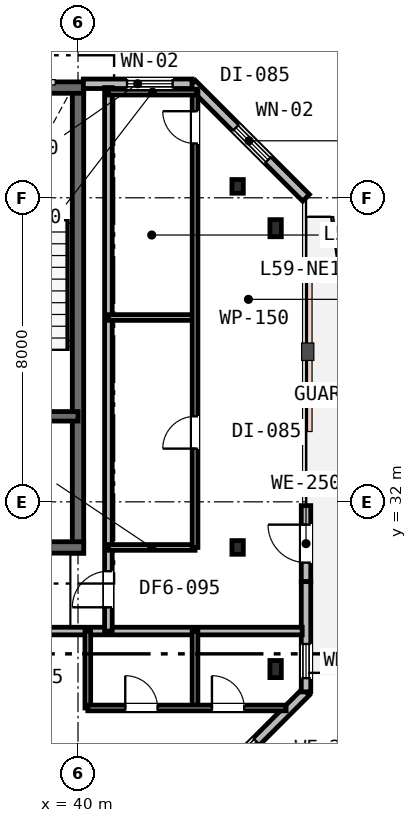
"""IFC4 building model, lengths in metres.
Left out: names, types, materials, properties, quantities, classifications, styles, units other than length and angle.
Written with IfcOpenShell. Run it as: python <this file> out.ifc"""

import sys

from ifc_helpers import new_model, si_unit, direction, frame, frame_2d, origin, origin_2d, place, context, subcontext, project, spatial, rectangle, i_section, extrude, element, fill, save


model = new_model("IFC4")
c1 = context("Model", 3, precision=1e-05, world=origin(), true_north=direction((0.0, 1.0)))
c2 = subcontext(c1, "Body", "Model", "MODEL_VIEW")
j1 = project(units=[si_unit("LENGTHUNIT", "METRE"), si_unit("PLANEANGLEUNIT", "RADIAN")], contexts=[c1])
p1 = place(None, origin())
s1 = spatial("IfcSite", under=j1, at=p1, CompositionType="ELEMENT")
p2 = place(p1, origin())
s2 = spatial("IfcBuilding", under=s1, at=p2, CompositionType="ELEMENT")
p3 = place(p2, frame((0.0, 0.0, 229.8)))
s3 = spatial("IfcBuildingStorey", under=s2, at=p3, CompositionType="ELEMENT", Elevation=229.8)
p4 = place(p3, frame((40.0, 30.65, 0.0), z_axis=(0.0, 0.0, 1.0), x_axis=(0.0, 1.0, 0.0)))
e1 = element("IfcWall", 1, at=p4, inside=s3, PredefinedType="SHEAR", context=c2, shape_type="SweptSolid", body=[
    extrude(rectangle(XDim=12.3, YDim=0.3, at=frame_2d((6.15, 0.0))), origin(), (0.0, 0.0, 1.0), 3.8),
])
p5 = place(p3, frame((15.85, 42.9, 0.0), z_axis=(0.0, 0.0, 1.0), x_axis=(1.0, 0.0, 0.0)))
e2 = element("IfcWall", 2, at=p5, inside=s3, PredefinedType="SHEAR", context=c2, shape_type="SweptSolid", body=[
    extrude(rectangle(XDim=24.3, YDim=0.3, at=frame_2d((12.15, 0.0))), origin(), (0.0, 0.0, 1.0), 3.8),
])
p6 = place(p5, frame((1.6, 0.0, 0.95)))
e3 = element("IfcOpeningElement", 3, at=p6, cuts=e2, PredefinedType="OPENING", context=c2, shape_type="SweptSolid", body=[
    extrude(rectangle(XDim=1.2, YDim=1.6, at=frame_2d((0.6, 0.8))), frame((0.0, 0.16, 0.0), z_axis=(0.0, -1.0, 0.0), x_axis=(1.0, 0.0, 0.0)), (0.0, 0.0, 1.0), 0.32),
])
p7 = place(p5, frame((16.5, 0.0, 0.95)))
e4 = element("IfcOpeningElement", 4, at=p7, cuts=e2, PredefinedType="OPENING", context=c2, shape_type="SweptSolid", body=[
    extrude(rectangle(XDim=1.2, YDim=1.6, at=frame_2d((0.6, 0.8))), frame((0.0, 0.16, 0.0), z_axis=(0.0, -1.0, 0.0), x_axis=(1.0, 0.0, 0.0)), (0.0, 0.0, 1.0), 0.32),
])
p8 = place(p5, frame((21.6, 0.0, 0.95)))
e5 = element("IfcOpeningElement", 5, at=p8, cuts=e2, PredefinedType="OPENING", context=c2, shape_type="SweptSolid", body=[
    extrude(rectangle(XDim=1.2, YDim=1.6, at=frame_2d((0.6, 0.8))), frame((0.0, 0.16, 0.0), z_axis=(0.0, -1.0, 0.0), x_axis=(1.0, 0.0, 0.0)), (0.0, 0.0, 1.0), 0.32),
])
p9 = place(p3, frame((28.95, 30.8, 0.0), z_axis=(0.0, 0.0, 1.0), x_axis=(1.0, 0.0, 0.0)))
e6 = element("IfcWall", 6, at=p9, inside=s3, PredefinedType="SHEAR", context=c2, shape_type="SweptSolid", body=[
    extrude(rectangle(XDim=11.2, YDim=0.3, at=frame_2d((5.6, 0.0))), origin(), (0.0, 0.0, 1.0), 3.8),
])
p10 = place(p9, frame((7.65, 0.0, 0.0)))
e7 = element("IfcOpeningElement", 7, at=p10, cuts=e6, PredefinedType="OPENING", context=c2, shape_type="SweptSolid", body=[
    extrude(rectangle(XDim=1.1, YDim=2.15, at=frame_2d((0.55, 1.075))), frame((0.0, 0.16, 0.0), z_axis=(0.0, -1.0, 0.0), x_axis=(1.0, 0.0, 0.0)), (0.0, 0.0, 1.0), 0.32),
])
p11 = place(p3, frame((33.95, 34.25, 0.0), z_axis=(0.0, 0.0, 1.0), x_axis=(1.0, 0.0, 0.0)))
e8 = element("IfcWall", 8, at=p11, inside=s3, PredefinedType="SHEAR", context=c2, shape_type="SweptSolid", body=[
    extrude(rectangle(XDim=6.05, YDim=0.25, at=frame_2d((3.025, 0.0))), origin(), (0.0, 0.0, 1.0), 3.8),
])
p12 = place(p11, frame((3.7, 0.0, 0.0)))
e9 = element("IfcOpeningElement", 9, at=p12, cuts=e8, PredefinedType="OPENING", context=c2, shape_type="SweptSolid", body=[
    extrude(rectangle(XDim=1.0, YDim=2.15, at=frame_2d((0.5, 1.075))), frame((0.0, 0.135, 0.0), z_axis=(0.0, -1.0, 0.0), x_axis=(1.0, 0.0, 0.0)), (0.0, 0.0, 1.0), 0.27),
])
p13 = place(p11, frame((0.55, 0.0, 0.0)))
e10 = element("IfcOpeningElement", 10, at=p13, cuts=e8, PredefinedType="OPENING", context=c2, shape_type="SweptSolid", body=[
    extrude(rectangle(XDim=1.1, YDim=2.15, at=frame_2d((0.55, 1.075))), frame((0.0, 0.135, 0.0), z_axis=(0.0, -1.0, 0.0), x_axis=(1.0, 0.0, 0.0)), (0.0, 0.0, 1.0), 0.27),
])
for number, where, z_axis, x_axis in (
    (11, (45.2, 27.6, 0.0), (0.0, 0.0, 1.0), (1.0, 0.0, 0.0)),
    (12, (45.2, 39.2, 0.0), (0.0, 0.0, 1.0), (1.0, 0.0, 0.0)),
):
    element("IfcColumn", number, at=place(p3, frame(where, z_axis=z_axis, x_axis=x_axis)), inside=s3, PredefinedType="COLUMN", context=c2, shape_type="SweptSolid", body=[
        extrude(i_section(OverallWidth=0.3, OverallDepth=0.45, WebThickness=0.014, FlangeThickness=0.026, FilletRadius=0.027, at=origin_2d()), origin(), (0.0, 0.0, 1.0), 3.8),
    ])
for number, where, z_axis, x_axis in (
    (13, (44.2, 30.8, 0.0), (0.0, 0.0, 1.0), (1.0, 0.0, 0.0)),
    (14, (44.2, 40.3, 0.0), (0.0, 0.0, 1.0), (1.0, 0.0, 0.0)),
):
    element("IfcColumn", number, at=place(p3, frame(where, z_axis=z_axis, x_axis=x_axis)), inside=s3, PredefinedType="COLUMN", context=c2, shape_type="SweptSolid", body=[
        extrude(i_section(OverallWidth=0.3, OverallDepth=0.36, WebThickness=0.013, FlangeThickness=0.022, FilletRadius=0.027, at=origin_2d()), origin(), (0.0, 0.0, 1.0), 3.8),
    ])
p14 = place(p3, frame((43.0, 24.0, 0.0), z_axis=(0.0, 0.0, 1.0), x_axis=(0.707106781187, 0.707106781187, 0.0)))
e15 = element("IfcWall", 15, at=p14, inside=s3, PredefinedType="STANDARD", context=c2, shape_type="SweptSolid", body=[
    extrude(rectangle(XDim=4.243, YDim=0.25, at=frame_2d((2.121, 0.0))), origin(), (0.0, 0.0, 1.0), 3.53),
])
p15 = place(p14, frame((1.196, 0.0, 0.85)))
e16 = element("IfcOpeningElement", 16, at=p15, cuts=e15, PredefinedType="OPENING", context=c2, shape_type="SweptSolid", body=[
    extrude(rectangle(XDim=1.2, YDim=1.6, at=frame_2d((0.6, 0.8))), frame((0.0, 0.135, 0.0), z_axis=(0.0, -1.0, 0.0), x_axis=(1.0, 0.0, 0.0)), (0.0, 0.0, 1.0), 0.27),
])
p16 = place(p3, frame((46.0, 29.9, 0.0), z_axis=(0.0, 0.0, 1.0), x_axis=(0.0, 1.0, 0.0)))
e17 = element("IfcWall", 17, at=p16, inside=s3, PredefinedType="STANDARD", context=c2, shape_type="SweptSolid", body=[
    extrude(rectangle(XDim=2.0, YDim=0.25, at=frame_2d((1.0, 0.0))), origin(), (0.0, 0.0, 1.0), 3.53),
])
p17 = place(p16, frame((0.5, 0.0, 0.0)))
e18 = element("IfcOpeningElement", 18, at=p17, cuts=e17, PredefinedType="OPENING", context=c2, shape_type="SweptSolid", body=[
    extrude(rectangle(XDim=1.0, YDim=2.15, at=frame_2d((0.5, 1.075))), frame((0.0, 0.135, 0.0), z_axis=(0.0, -1.0, 0.0), x_axis=(1.0, 0.0, 0.0)), (0.0, 0.0, 1.0), 0.27),
])
p18 = place(p3, frame((46.0, 27.0, 0.0), z_axis=(0.0, 0.0, 1.0), x_axis=(0.0, 1.0, 0.0)))
e19 = element("IfcWall", 19, at=p18, inside=s3, PredefinedType="STANDARD", context=c2, shape_type="SweptSolid", body=[
    extrude(rectangle(XDim=2.9, YDim=0.25, at=frame_2d((1.45, 0.0))), origin(), (0.0, 0.0, 1.0), 3.53),
])
p19 = place(p18, frame((0.36, 0.0, 0.9)))
e20 = element("IfcOpeningElement", 20, at=p19, cuts=e19, PredefinedType="OPENING", context=c2, shape_type="SweptSolid", body=[
    extrude(rectangle(XDim=0.9, YDim=1.55, at=frame_2d((0.45, 0.775))), frame((0.0, 0.135, 0.0), z_axis=(0.0, -1.0, 0.0), x_axis=(1.0, 0.0, 0.0)), (0.0, 0.0, 1.0), 0.27),
])
p20 = place(p3, frame((46.0, 40.0, 0.0), z_axis=(0.0, 0.0, 1.0), x_axis=(-0.707106781187, 0.707106781187, 0.0)))
e21 = element("IfcWall", 21, at=p20, inside=s3, PredefinedType="STANDARD", context=c2, shape_type="SweptSolid", body=[
    extrude(rectangle(XDim=4.243, YDim=0.25, at=frame_2d((2.121, 0.0))), origin(), (0.0, 0.0, 1.0), 3.53),
])
p21 = place(p20, frame((1.411, 0.0, 0.85)))
e22 = element("IfcOpeningElement", 22, at=p21, cuts=e21, PredefinedType="OPENING", context=c2, shape_type="SweptSolid", body=[
    extrude(rectangle(XDim=1.2, YDim=1.6, at=frame_2d((0.6, 0.8))), frame((0.0, 0.135, 0.0), z_axis=(0.0, -1.0, 0.0), x_axis=(1.0, 0.0, 0.0)), (0.0, 0.0, 1.0), 0.27),
])
p22 = place(p3, frame((43.0, 43.0, 0.0), z_axis=(0.0, 0.0, 1.0), x_axis=(-1.0, 0.0, 0.0)))
e23 = element("IfcWall", 23, at=p22, inside=s3, PredefinedType="STANDARD", context=c2, shape_type="SweptSolid", body=[
    extrude(rectangle(XDim=2.86, YDim=0.25, at=frame_2d((1.43, 0.0))), origin(), (0.0, 0.0, 1.0), 3.53),
])
p23 = place(p22, frame((0.51, 0.0, 0.85)))
e24 = element("IfcOpeningElement", 24, at=p23, cuts=e23, PredefinedType="OPENING", context=c2, shape_type="SweptSolid", body=[
    extrude(rectangle(XDim=1.2, YDim=1.6, at=frame_2d((0.6, 0.8))), frame((0.0, 0.135, 0.0), z_axis=(0.0, -1.0, 0.0), x_axis=(1.0, 0.0, 0.0)), (0.0, 0.0, 1.0), 0.27),
])
p24 = place(p3, frame((20.2, 28.6, 0.0), z_axis=(0.0, 0.0, 1.0), x_axis=(1.0, 0.0, 0.0)))
e25 = element("IfcWall", 25, at=p24, inside=s3, PredefinedType="PARTITIONING", context=c2, shape_type="SweptSolid", body=[
    extrude(rectangle(XDim=25.7, YDim=0.2, at=frame_2d((12.85, 0.0))), origin(), (0.0, 0.0, 1.0), 2.92),
])
p25 = place(p24, frame((4.475, 0.0, 0.0)))
e26 = element("IfcOpeningElement", 26, at=p25, cuts=e25, PredefinedType="OPENING", context=c2, shape_type="SweptSolid", body=[
    extrude(rectangle(XDim=0.95, YDim=2.15, at=frame_2d((0.475, 1.075))), frame((0.0, 0.11, 0.0), z_axis=(0.0, -1.0, 0.0), x_axis=(1.0, 0.0, 0.0)), (0.0, 0.0, 1.0), 0.22),
])
p26 = place(p24, frame((10.875, 0.0, 0.0)))
e27 = element("IfcOpeningElement", 27, at=p26, cuts=e25, PredefinedType="OPENING", context=c2, shape_type="SweptSolid", body=[
    extrude(rectangle(XDim=0.95, YDim=2.15, at=frame_2d((0.475, 1.075))), frame((0.0, 0.11, 0.0), z_axis=(0.0, -1.0, 0.0), x_axis=(1.0, 0.0, 0.0)), (0.0, 0.0, 1.0), 0.22),
])
p27 = place(p24, frame((17.854, 0.0, 0.0)))
e28 = element("IfcOpeningElement", 28, at=p27, cuts=e25, PredefinedType="OPENING", context=c2, shape_type="SweptSolid", body=[
    extrude(rectangle(XDim=0.95, YDim=2.15, at=frame_2d((0.475, 1.075))), frame((0.0, 0.11, 0.0), z_axis=(0.0, -1.0, 0.0), x_axis=(1.0, 0.0, 0.0)), (0.0, 0.0, 1.0), 0.22),
])
p28 = place(p3, frame((40.8, 28.6, 0.0), z_axis=(0.0, 0.0, 1.0), x_axis=(0.0, 1.0, 0.0)))
e29 = element("IfcWall", 29, at=p28, inside=s3, PredefinedType="PARTITIONING", context=c2, shape_type="SweptSolid", body=[
    extrude(rectangle(XDim=14.3, YDim=0.2, at=frame_2d((7.15, 0.0))), origin(), (0.0, 0.0, 1.0), 2.92),
])
p29 = place(p28, frame((0.625, 0.0, 0.0)))
e30 = element("IfcOpeningElement", 30, at=p29, cuts=e29, PredefinedType="OPENING", context=c2, shape_type="SweptSolid", body=[
    extrude(rectangle(XDim=0.95, YDim=2.15, at=frame_2d((0.475, 1.075))), frame((0.0, 0.11, 0.0), z_axis=(0.0, -1.0, 0.0), x_axis=(1.0, 0.0, 0.0)), (0.0, 0.0, 1.0), 0.22),
])
p30 = place(p3, frame((40.8, 30.8, 0.0), z_axis=(0.0, 0.0, 1.0), x_axis=(1.0, 0.0, 0.0)))
e31 = element("IfcWall", 31, at=p30, inside=s3, PredefinedType="PARTITIONING", context=c2, shape_type="SweptSolid", body=[
    extrude(rectangle(XDim=2.28, YDim=0.15, at=frame_2d((1.14, 0.0))), origin(), (0.0, 0.0, 1.0), 2.92),
])
p31 = place(p3, frame((40.8, 36.85, 0.0), z_axis=(0.0, 0.0, 1.0), x_axis=(1.0, 0.0, 0.0)))
e32 = element("IfcWall", 32, at=p31, inside=s3, PredefinedType="PARTITIONING", context=c2, shape_type="SweptSolid", body=[
    extrude(rectangle(XDim=2.28, YDim=0.15, at=frame_2d((1.14, 0.0))), origin(), (0.0, 0.0, 1.0), 3.53),
])
p32 = place(p3, frame((43.08, 30.8, 0.0), z_axis=(0.0, 0.0, 1.0), x_axis=(0.0, 1.0, 0.0)))
e33 = element("IfcWall", 33, at=p32, inside=s3, PredefinedType="PARTITIONING", context=c2, shape_type="SweptSolid", body=[
    extrude(rectangle(XDim=12.02, YDim=0.15, at=frame_2d((6.01, 0.0))), origin(), (0.0, 0.0, 1.0), 2.92),
])
p33 = place(p32, frame((2.6, 0.0, 0.0)))
e34 = element("IfcOpeningElement", 34, at=p33, cuts=e33, PredefinedType="OPENING", context=c2, shape_type="SweptSolid", body=[
    extrude(rectangle(XDim=0.85, YDim=2.15, at=frame_2d((0.425, 1.075))), frame((0.0, 0.085, 0.0), z_axis=(0.0, -1.0, 0.0), x_axis=(1.0, 0.0, 0.0)), (0.0, 0.0, 1.0), 0.17),
])
p34 = place(p32, frame((10.629, 0.0, 0.0)))
e35 = element("IfcOpeningElement", 35, at=p34, cuts=e33, PredefinedType="OPENING", context=c2, shape_type="SweptSolid", body=[
    extrude(rectangle(XDim=0.85, YDim=2.15, at=frame_2d((0.425, 1.075))), frame((0.0, 0.085, 0.0), z_axis=(0.0, -1.0, 0.0), x_axis=(1.0, 0.0, 0.0)), (0.0, 0.0, 1.0), 0.17),
])
p35 = place(p3, frame((40.8, 42.78, 0.0), z_axis=(0.0, 0.0, 1.0), x_axis=(1.0, 0.0, 0.0)))
e36 = element("IfcWall", 36, at=p35, inside=s3, PredefinedType="PARTITIONING", context=c2, shape_type="SweptSolid", body=[
    extrude(rectangle(XDim=2.32, YDim=0.15, at=frame_2d((1.16, 0.0))), origin(), (0.0, 0.0, 1.0), 3.53),
])
for number, where, z_axis, x_axis in (
    (37, (40.258, 26.576, 0.0), (0.0, 0.0, 1.0), (0.0, 1.0, 0.0)),
    (38, (43.079, 26.576, 0.0), (0.0, 0.0, 1.0), (0.0, 1.0, 0.0)),
):
    element("IfcWall", number, at=place(p3, frame(where, z_axis=z_axis, x_axis=x_axis)), inside=s3, PredefinedType="PARTITIONING", context=c2, shape_type="SweptSolid", body=[
        extrude(rectangle(XDim=2.024, YDim=0.15, at=frame_2d((1.012, 0.0))), origin(), (0.0, 0.0, 1.0), 3.53),
    ])
p36 = place(p3, frame((40.258, 26.576, 0.0), z_axis=(0.0, 0.0, 1.0), x_axis=(1.0, 0.0, 0.0)))
e39 = element("IfcWall", 39, at=p36, inside=s3, PredefinedType="PARTITIONING", context=c2, shape_type="SweptSolid", body=[
    extrude(rectangle(XDim=5.218, YDim=0.15, at=frame_2d((2.609, 0.0))), origin(), (0.0, 0.0, 1.0), 3.53),
])
p37 = place(p36, frame((0.986, 0.0, 0.0)))
e40 = element("IfcOpeningElement", 40, at=p37, cuts=e39, PredefinedType="OPENING", context=c2, shape_type="SweptSolid", body=[
    extrude(rectangle(XDim=0.85, YDim=2.15, at=frame_2d((0.425, 1.075))), frame((0.0, 0.085, 0.0), z_axis=(0.0, -1.0, 0.0), x_axis=(1.0, 0.0, 0.0)), (0.0, 0.0, 1.0), 0.17),
])
p38 = place(p36, frame((3.267, 0.0, 0.0)))
e41 = element("IfcOpeningElement", 41, at=p38, cuts=e39, PredefinedType="OPENING", context=c2, shape_type="SweptSolid", body=[
    extrude(rectangle(XDim=0.85, YDim=2.15, at=frame_2d((0.425, 1.075))), frame((0.0, 0.085, 0.0), z_axis=(0.0, -1.0, 0.0), x_axis=(1.0, 0.0, 0.0)), (0.0, 0.0, 1.0), 0.17),
])
p39 = place(p15, origin())
e42 = element("IfcWindow", 42, at=p39, inside=s3, PartitioningType="SINGLE_PANEL", PredefinedType="WINDOW", context=c2, shape_type="SweptSolid", body=[
    extrude(rectangle(XDim=1.2, YDim=1.6, at=frame_2d((0.6, 0.8))), frame((0.0, 0.03, 0.0), z_axis=(0.0, -1.0, 0.0), x_axis=(1.0, 0.0, 0.0)), (0.0, 0.0, 1.0), 0.06),
])
fill(e16, e42)
p40 = place(p17, origin())
e43 = element("IfcDoor", 43, at=p40, inside=s3, OperationType="SINGLE_SWING_RIGHT", PredefinedType="DOOR", context=c2, shape_type="SweptSolid", body=[
    extrude(rectangle(XDim=1.0, YDim=2.15, at=frame_2d((0.5, 1.075))), frame((0.0, 0.025, 0.0), z_axis=(0.0, -1.0, 0.0), x_axis=(1.0, 0.0, 0.0)), (0.0, 0.0, 1.0), 0.05),
])
fill(e18, e43)
p41 = place(p19, origin())
e44 = element("IfcWindow", 44, at=p41, inside=s3, PartitioningType="SINGLE_PANEL", PredefinedType="WINDOW", context=c2, shape_type="SweptSolid", body=[
    extrude(rectangle(XDim=0.9, YDim=1.55, at=frame_2d((0.45, 0.775))), frame((0.0, 0.03, 0.0), z_axis=(0.0, -1.0, 0.0), x_axis=(1.0, 0.0, 0.0)), (0.0, 0.0, 1.0), 0.06),
])
fill(e20, e44)
p42 = place(p21, origin())
e45 = element("IfcWindow", 45, at=p42, inside=s3, PartitioningType="SINGLE_PANEL", PredefinedType="WINDOW", context=c2, shape_type="SweptSolid", body=[
    extrude(rectangle(XDim=1.2, YDim=1.6, at=frame_2d((0.6, 0.8))), frame((0.0, 0.03, 0.0), z_axis=(0.0, -1.0, 0.0), x_axis=(1.0, 0.0, 0.0)), (0.0, 0.0, 1.0), 0.06),
])
fill(e22, e45)
p43 = place(p23, origin())
e46 = element("IfcWindow", 46, at=p43, inside=s3, PartitioningType="SINGLE_PANEL", PredefinedType="WINDOW", context=c2, shape_type="SweptSolid", body=[
    extrude(rectangle(XDim=1.2, YDim=1.6, at=frame_2d((0.6, 0.8))), frame((0.0, 0.03, 0.0), z_axis=(0.0, -1.0, 0.0), x_axis=(1.0, 0.0, 0.0)), (0.0, 0.0, 1.0), 0.06),
])
fill(e24, e46)
p44 = place(p29, origin())
e47 = element("IfcDoor", 47, at=p44, inside=s3, OperationType="SINGLE_SWING_LEFT", PredefinedType="DOOR", context=c2, shape_type="SweptSolid", body=[
    extrude(rectangle(XDim=0.95, YDim=2.15, at=frame_2d((0.475, 1.075))), frame((0.0, 0.025, 0.0), z_axis=(0.0, -1.0, 0.0), x_axis=(1.0, 0.0, 0.0)), (0.0, 0.0, 1.0), 0.05),
])
fill(e30, e47)
p45 = place(p33, origin())
e48 = element("IfcDoor", 48, at=p45, inside=s3, OperationType="SINGLE_SWING_LEFT", PredefinedType="DOOR", context=c2, shape_type="SweptSolid", body=[
    extrude(rectangle(XDim=0.85, YDim=2.15, at=frame_2d((0.425, 1.075))), frame((0.0, 0.025, 0.0), z_axis=(0.0, -1.0, 0.0), x_axis=(1.0, 0.0, 0.0)), (0.0, 0.0, 1.0), 0.05),
])
fill(e34, e48)
p46 = place(p34, origin())
e49 = element("IfcDoor", 49, at=p46, inside=s3, OperationType="SINGLE_SWING_RIGHT", PredefinedType="DOOR", context=c2, shape_type="SweptSolid", body=[
    extrude(rectangle(XDim=0.85, YDim=2.15, at=frame_2d((0.425, 1.075))), frame((0.0, 0.025, 0.0), z_axis=(0.0, -1.0, 0.0), x_axis=(1.0, 0.0, 0.0)), (0.0, 0.0, 1.0), 0.05),
])
fill(e35, e49)
p47 = place(p37, origin())
e50 = element("IfcDoor", 50, at=p47, inside=s3, OperationType="SINGLE_SWING_LEFT", PredefinedType="DOOR", context=c2, shape_type="SweptSolid", body=[
    extrude(rectangle(XDim=0.85, YDim=2.15, at=frame_2d((0.425, 1.075))), frame((0.0, 0.025, 0.0), z_axis=(0.0, -1.0, 0.0), x_axis=(1.0, 0.0, 0.0)), (0.0, 0.0, 1.0), 0.05),
])
fill(e40, e50)
p48 = place(p38, origin())
e51 = element("IfcDoor", 51, at=p48, inside=s3, OperationType="SINGLE_SWING_LEFT", PredefinedType="DOOR", context=c2, shape_type="SweptSolid", body=[
    extrude(rectangle(XDim=0.85, YDim=2.15, at=frame_2d((0.425, 1.075))), frame((0.0, 0.025, 0.0), z_axis=(0.0, -1.0, 0.0), x_axis=(1.0, 0.0, 0.0)), (0.0, 0.0, 1.0), 0.05),
])
fill(e41, e51)
save(model, sys.argv[1])
